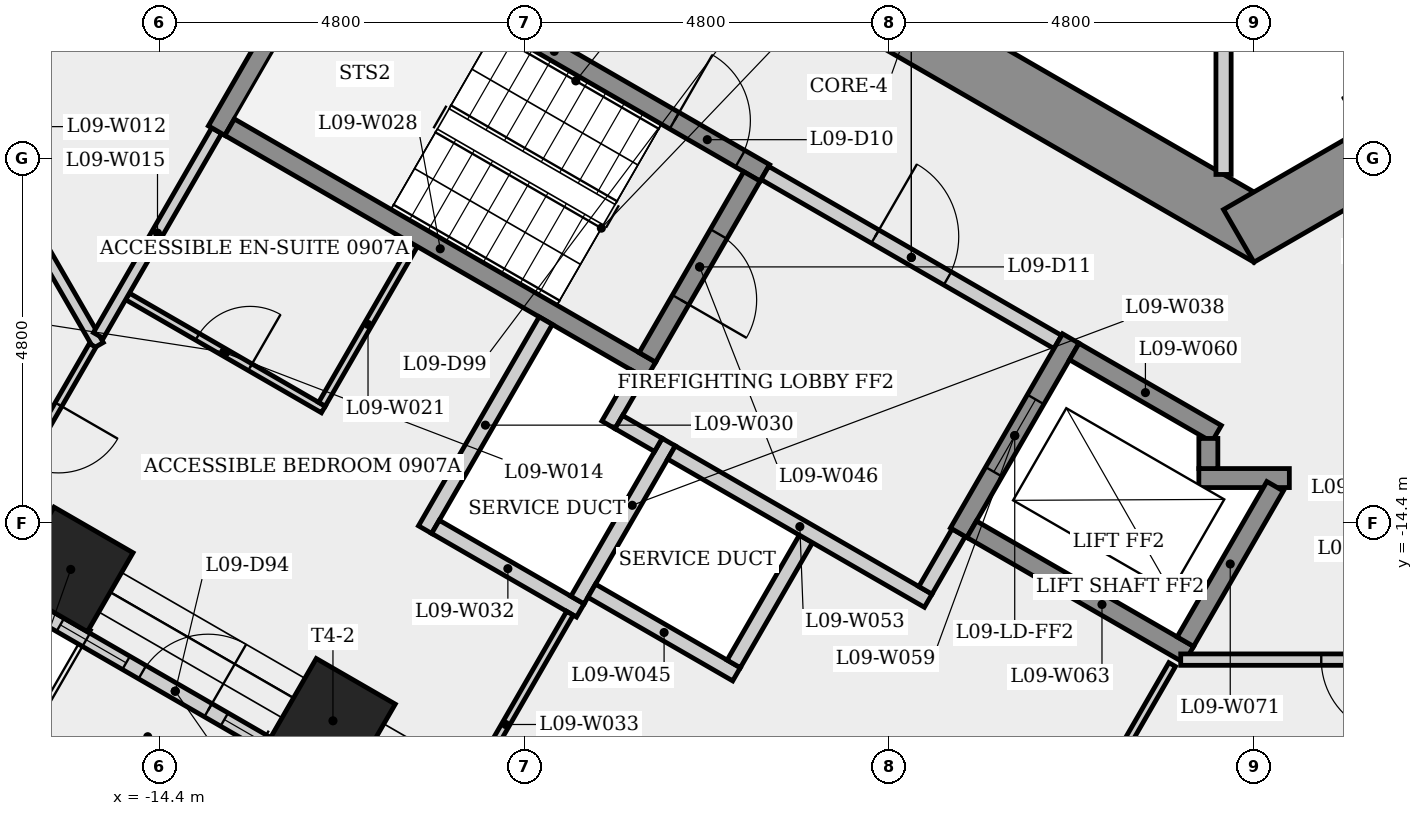
"""IFC4 building model, lengths in metres.
Left out: names, types, materials, properties, quantities, classifications, styles, units other than length and angle.
Written with IfcOpenShell. Run it as: python <this file> out.ifc"""

import sys

from ifc_helpers import new_model, si_unit, direction, frame, frame_2d, origin, origin_2d, place, context, subcontext, project, spatial, rectangle, extrude, element, fill, save


model = new_model("IFC4")
c1 = context("Model", 3, precision=1e-05, world=origin(), true_north=direction((0.0, 1.0)))
c2 = subcontext(c1, "Body", "Model", "MODEL_VIEW")
j1 = project(units=[si_unit("LENGTHUNIT", "METRE"), si_unit("PLANEANGLEUNIT", "RADIAN")], contexts=[c1])
p1 = place(None, origin())
s1 = spatial("IfcSite", under=j1, at=p1, CompositionType="ELEMENT")
p2 = place(p1, origin())
s2 = spatial("IfcBuilding", under=s1, at=p2, CompositionType="ELEMENT")
p3 = place(p2, frame((0.0, 0.0, 39.1)))
s3 = spatial("IfcBuildingStorey", under=s2, at=p3, CompositionType="ELEMENT", Elevation=39.1)
p4 = place(p3, frame((-9.3, -5.138, 0.0), z_axis=(0.0, 0.0, 1.0), x_axis=(0.866023993627, -0.500002442456, 0.0)))
e1 = element("IfcWall", 1, at=p4, inside=s3, PredefinedType="SHEAR", context=c2, shape_type="SweptSolid", body=[
    extrude(rectangle(XDim=10.97, YDim=0.8, at=frame_2d((5.485, 0.0))), origin(), (0.0, 0.0, 1.0), 3.4),
])
p5 = place(p4, frame((3.192, 0.0, 0.0)))
e2 = element("IfcOpeningElement", 2, at=p5, cuts=e1, PredefinedType="OPENING", context=c2, shape_type="SweptSolid", body=[
    extrude(rectangle(XDim=0.9, YDim=2.1, at=frame_2d((0.45, 1.05))), frame((0.0, 0.41, 0.0), z_axis=(0.0, -1.0, 0.0), x_axis=(1.0, 0.0, 0.0)), (0.0, 0.0, 1.0), 0.82),
])
p6 = place(p3, frame((-0.2, -10.623, 0.0), z_axis=(0.0, 0.0, 1.0), x_axis=(0.866023993627, 0.500002442456, 0.0)))
e3 = element("IfcWall", 3, at=p6, inside=s3, PredefinedType="SHEAR", context=c2, shape_type="SweptSolid", body=[
    extrude(rectangle(XDim=10.97, YDim=0.8, at=frame_2d((5.485, 0.0))), origin(), (0.0, 0.0, 1.0), 3.4),
])
p7 = place(p6, frame((2.091, 0.0, 0.0)))
e4 = element("IfcOpeningElement", 4, at=p7, cuts=e3, PredefinedType="OPENING", context=c2, shape_type="SweptSolid", body=[
    extrude(rectangle(XDim=0.9, YDim=2.1, at=frame_2d((0.45, 1.05))), frame((0.0, 0.41, 0.0), z_axis=(0.0, -1.0, 0.0), x_axis=(1.0, 0.0, 0.0)), (0.0, 0.0, 1.0), 0.82),
])
p8 = place(p6, frame((9.325, 0.0, 0.0)))
e5 = element("IfcOpeningElement", 5, at=p8, cuts=e3, PredefinedType="OPENING", context=c2, shape_type="SweptSolid", body=[
    extrude(rectangle(XDim=0.9, YDim=2.1, at=frame_2d((0.45, 1.05))), frame((0.0, 0.41, 0.0), z_axis=(0.0, -1.0, 0.0), x_axis=(1.0, 0.0, 0.0)), (0.0, 0.0, 1.0), 0.82),
])
for number, where, z_axis, x_axis in (
    (6, (-15.567, -15.012, 0.0), (0.0, 0.0, 1.0), (-0.5, -0.866, 0.0)),
    (7, (-12.117, -17.004, 0.0), (0.0, 0.0, 1.0), (-0.5, -0.866, 0.0)),
):
    element("IfcColumn", number, at=place(p3, frame(where, z_axis=z_axis, x_axis=x_axis)), inside=s3, PredefinedType="COLUMN", context=c2, shape_type="SweptSolid", body=[
        extrude(rectangle(XDim=1.2, YDim=1.2, at=origin_2d()), origin(), (0.0, 0.0, 1.0), 3.4),
    ])
p9 = place(p3, frame((-15.918, -15.618, 0.0), z_axis=(0.0, 0.0, 1.0), x_axis=(0.86602842894, -0.499994760241, 0.0)))
e8 = element("IfcWall", 8, at=p9, inside=s3, PredefinedType="SOLIDWALL", context=c2, shape_type="SweptSolid", body=[
    extrude(rectangle(XDim=3.984, YDim=0.2, at=frame_2d((1.992, 0.0))), origin(), (0.0, 0.0, 1.0), 3.4),
])
p10 = place(p9, frame((1.492, 0.0, 0.0)))
e9 = element("IfcOpeningElement", 9, at=p10, cuts=e8, PredefinedType="OPENING", context=c2, shape_type="SweptSolid", body=[
    extrude(rectangle(XDim=1.0, YDim=2.4, at=frame_2d((0.5, 1.2))), frame((0.0, 0.11, 0.0), z_axis=(0.0, -1.0, 0.0), x_axis=(1.0, 0.0, 0.0)), (0.0, 0.0, 1.0), 0.22),
])
p11 = place(p9, frame((0.246, 0.0, 0.9)))
e10 = element("IfcOpeningElement", 10, at=p11, cuts=e8, PredefinedType="OPENING", context=c2, shape_type="SweptSolid", body=[
    extrude(rectangle(XDim=1.0, YDim=1.5, at=frame_2d((0.5, 0.75))), frame((0.0, 0.11, 0.0), z_axis=(0.0, -1.0, 0.0), x_axis=(1.0, 0.0, 0.0)), (0.0, 0.0, 1.0), 0.22),
])
p12 = place(p9, frame((2.738, 0.0, 0.9)))
e11 = element("IfcOpeningElement", 11, at=p12, cuts=e8, PredefinedType="OPENING", context=c2, shape_type="SweptSolid", body=[
    extrude(rectangle(XDim=1.0, YDim=1.5, at=frame_2d((0.5, 0.75))), frame((0.0, 0.11, 0.0), z_axis=(0.0, -1.0, 0.0), x_axis=(1.0, 0.0, 0.0)), (0.0, 0.0, 1.0), 0.22),
])
p13 = place(p3, frame((-15.204, -12.064, 0.0), z_axis=(0.0, 0.0, 1.0), x_axis=(-0.500026652407, 0.866010015463, 0.0)))
e12 = element("IfcWall", 12, at=p13, inside=s3, PredefinedType="PARTITIONING", context=c2, shape_type="SweptSolid", body=[
    extrude(rectangle(XDim=6.646, YDim=0.15, at=frame_2d((3.323, 0.0))), origin(), (0.0, 0.0, 1.0), 3.05),
])
p14 = place(p13, frame((2.878, 0.0, 0.0)))
e13 = element("IfcOpeningElement", 13, at=p14, cuts=e12, PredefinedType="OPENING", context=c2, shape_type="SweptSolid", body=[
    extrude(rectangle(XDim=1.0, YDim=2.1, at=frame_2d((0.5, 1.05))), frame((0.0, 0.085, 0.0), z_axis=(0.0, -1.0, 0.0), x_axis=(1.0, 0.0, 0.0)), (0.0, 0.0, 1.0), 0.17),
])
p15 = place(p3, frame((-15.279, -12.064, 0.0), z_axis=(0.0, 0.0, 1.0), x_axis=(-0.500013311227, -0.866017718408, 0.0)))
e14 = element("IfcWall", 14, at=p15, inside=s3, PredefinedType="PARTITIONING", context=c2, shape_type="SweptSolid", body=[
    extrude(rectangle(XDim=3.294, YDim=0.1, at=frame_2d((1.647, 0.0))), origin(), (0.0, 0.0, 1.0), 3.05),
])
p16 = place(p15, frame((0.899, 0.0, 0.0)))
e15 = element("IfcOpeningElement", 15, at=p16, cuts=e14, PredefinedType="OPENING", context=c2, shape_type="SweptSolid", body=[
    extrude(rectangle(XDim=0.9, YDim=2.1, at=frame_2d((0.45, 1.05))), frame((0.0, 0.06, 0.0), z_axis=(0.0, -1.0, 0.0), x_axis=(1.0, 0.0, 0.0)), (0.0, 0.0, 1.0), 0.12),
])
p17 = place(p3, frame((-14.82, -11.42, 0.0), z_axis=(0.0, 0.0, 1.0), x_axis=(0.866017493347, -0.500013701029, 0.0)))
e16 = element("IfcWall", 16, at=p17, inside=s3, PredefinedType="PARTITIONING", context=c2, shape_type="SweptSolid", body=[
    extrude(rectangle(XDim=2.975, YDim=0.1, at=frame_2d((1.488, 0.0))), origin(), (0.0, 0.0, 1.0), 3.05),
])
p18 = place(p17, frame((1.062, 0.0, 0.0)))
e17 = element("IfcOpeningElement", 17, at=p18, cuts=e16, PredefinedType="OPENING", context=c2, shape_type="SweptSolid", body=[
    extrude(rectangle(XDim=0.8, YDim=2.1, at=frame_2d((0.4, 1.05))), frame((0.0, 0.06, 0.0), z_axis=(0.0, -1.0, 0.0), x_axis=(1.0, 0.0, 0.0)), (0.0, 0.0, 1.0), 0.12),
])
p19 = place(p3, frame((-15.204, -11.934, 0.0), z_axis=(0.0, 0.0, 1.0), x_axis=(0.500037089193, 0.86600398927, 0.0)))
e18 = element("IfcWall", 18, at=p19, inside=s3, PredefinedType="PARTITIONING", context=c2, shape_type="SweptSolid", body=[
    extrude(rectangle(XDim=3.112, YDim=0.15, at=frame_2d((1.556, 0.0))), origin(), (0.0, 0.0, 1.0), 3.05),
])
p20 = place(p3, frame((-13.648, -9.239, 0.0), z_axis=(0.0, 0.0, 1.0), x_axis=(0.500017246033, 0.866015446554, 0.0)))
e19 = element("IfcWall", 19, at=p20, inside=s3, PredefinedType="SHEAR", context=c2, shape_type="SweptSolid", body=[
    extrude(rectangle(XDim=3.25, YDim=0.25, at=frame_2d((1.625, 0.0))), origin(), (0.0, 0.0, 1.0), 3.05),
])
p21 = place(p3, frame((-12.262, -12.839, 0.0), z_axis=(0.0, 0.0, 1.0), x_axis=(0.499972286653, 0.866041403502, 0.0)))
e20 = element("IfcWall", 20, at=p21, inside=s3, PredefinedType="PARTITIONING", context=c2, shape_type="SweptSolid", body=[
    extrude(rectangle(XDim=2.425, YDim=0.1, at=frame_2d((1.212, 0.0))), origin(), (0.0, 0.0, 1.0), 3.05),
])
p22 = place(p3, frame((-11.977, -6.595, 0.0), z_axis=(0.0, 0.0, 1.0), x_axis=(0.866025499775, -0.499999833739, 0.0)))
e21 = element("IfcWall", 21, at=p22, inside=s3, PredefinedType="SHEAR", context=c2, shape_type="SweptSolid", body=[
    extrude(rectangle(XDim=6.4, YDim=0.25, at=frame_2d((3.2, 0.0))), origin(), (0.0, 0.0, 1.0), 3.05),
])
p23 = place(p22, frame((5.025, 0.0, 0.0)))
e22 = element("IfcOpeningElement", 22, at=p23, cuts=e21, PredefinedType="OPENING", context=c2, shape_type="SweptSolid", body=[
    extrude(rectangle(XDim=1.0, YDim=2.1, at=frame_2d((0.5, 1.05))), frame((0.0, 0.135, 0.0), z_axis=(0.0, -1.0, 0.0), x_axis=(1.0, 0.0, 0.0)), (0.0, 0.0, 1.0), 0.27),
])
p24 = place(p3, frame((-13.477, -9.193, 0.0), z_axis=(0.0, 0.0, 1.0), x_axis=(0.866025499775, -0.499999833739, 0.0)))
e23 = element("IfcWall", 23, at=p24, inside=s3, PredefinedType="SHEAR", context=c2, shape_type="SweptSolid", body=[
    extrude(rectangle(XDim=6.4, YDim=0.25, at=frame_2d((3.2, 0.0))), origin(), (0.0, 0.0, 1.0), 3.05),
])
p25 = place(p3, frame((-10.905, -14.489, 0.0), z_axis=(0.0, 0.0, 1.0), x_axis=(0.499959856469, 0.866048579423, 0.0)))
e24 = element("IfcWall", 24, at=p25, inside=s3, PredefinedType="PLUMBINGWALL", context=c2, shape_type="SweptSolid", body=[
    extrude(rectangle(XDim=3.175, YDim=0.2, at=frame_2d((1.587, 0.0))), origin(), (0.0, 0.0, 1.0), 3.05),
])
p26 = place(p3, frame((-8.863, -15.552, 0.0), z_axis=(0.0, 0.0, 1.0), x_axis=(-0.866035918664, 0.499981787252, 0.0)))
e25 = element("IfcWall", 25, at=p26, inside=s3, PredefinedType="PLUMBINGWALL", context=c2, shape_type="SweptSolid", body=[
    extrude(rectangle(XDim=2.2, YDim=0.2, at=frame_2d((1.1, 0.0))), origin(), (0.0, 0.0, 1.0), 3.05),
])
p27 = place(p3, frame((-9.0, -15.588, 0.0), z_axis=(0.0, 0.0, 1.0), x_axis=(-0.499968344795, -0.866043679154, 0.0)))
e26 = element("IfcWall", 26, at=p27, inside=s3, PredefinedType="PARTITIONING", context=c2, shape_type="SweptSolid", body=[
    extrude(rectangle(XDim=3.381, YDim=0.1, at=frame_2d((1.69, 0.0))), origin(), (0.0, 0.0, 1.0), 3.05),
])
p28 = place(p3, frame((-8.493, -13.11, 0.0), z_axis=(0.0, 0.0, 1.0), x_axis=(0.500067724834, 0.865986299303, 0.0)))
e27 = element("IfcWall", 27, at=p28, inside=s3, PredefinedType="PLUMBINGWALL", context=c2, shape_type="SweptSolid", body=[
    extrude(rectangle(XDim=0.775, YDim=0.2, at=frame_2d((0.388, 0.0))), origin(), (0.0, 0.0, 1.0), 3.05),
])
p29 = place(p3, frame((-7.7, -13.337, 0.0), z_axis=(0.0, 0.0, 1.0), x_axis=(-0.500001309137, -0.866024647952, 0.0)))
e28 = element("IfcWall", 28, at=p29, inside=s3, PredefinedType="PLUMBINGWALL", context=c2, shape_type="SweptSolid", body=[
    extrude(rectangle(XDim=2.4, YDim=0.2, at=frame_2d((1.2, 0.0))), origin(), (0.0, 0.0, 1.0), 3.05),
])
p30 = place(p3, frame((-7.836, -13.373, 0.0), z_axis=(0.0, 0.0, 1.0), x_axis=(-0.866232998003, 0.499640263761, 0.0)))
e29 = element("IfcWall", 29, at=p30, inside=s3, PredefinedType="PLUMBINGWALL", context=c2, shape_type="SweptSolid", body=[
    extrude(rectangle(XDim=0.6, YDim=0.2, at=frame_2d((0.3, 0.0))), origin(), (0.0, 0.0, 1.0), 3.05),
])
p31 = place(p3, frame((-6.808, -16.392, 0.0), z_axis=(0.0, 0.0, 1.0), x_axis=(-0.866008176907, 0.50002983664, 0.0)))
e30 = element("IfcWall", 30, at=p31, inside=s3, PredefinedType="PLUMBINGWALL", context=c2, shape_type="SweptSolid", body=[
    extrude(rectangle(XDim=2.2, YDim=0.2, at=frame_2d((1.1, 0.0))), origin(), (0.0, 0.0, 1.0), 3.05),
])
p32 = place(p3, frame((-6.605, -9.841, 0.0), z_axis=(0.0, 0.0, 1.0), x_axis=(-0.499996545922, -0.866027397988, 0.0)))
e31 = element("IfcWall", 31, at=p32, inside=s3, PredefinedType="SHEAR", context=c2, shape_type="SweptSolid", body=[
    extrude(rectangle(XDim=2.75, YDim=0.25, at=frame_2d((1.375, 0.0))), origin(), (0.0, 0.0, 1.0), 3.05),
])
p33 = place(p32, frame((0.875, 0.0, 0.0)))
e32 = element("IfcOpeningElement", 32, at=p33, cuts=e31, PredefinedType="OPENING", context=c2, shape_type="SweptSolid", body=[
    extrude(rectangle(XDim=1.0, YDim=2.1, at=frame_2d((0.5, 1.05))), frame((0.0, 0.135, 0.0), z_axis=(0.0, -1.0, 0.0), x_axis=(1.0, 0.0, 0.0)), (0.0, 0.0, 1.0), 0.27),
])
p34 = place(p3, frame((-6.435, -9.795, 0.0), z_axis=(0.0, 0.0, 1.0), x_axis=(0.866012907634, -0.500021643343, 0.0)))
e33 = element("IfcWall", 33, at=p34, inside=s3, PredefinedType="PARTITIONING", context=c2, shape_type="SweptSolid", body=[
    extrude(rectangle(XDim=4.45, YDim=0.2, at=frame_2d((2.225, 0.0))), origin(), (0.0, 0.0, 1.0), 3.05),
])
p35 = place(p34, frame((1.675, 0.0, 0.0)))
e34 = element("IfcOpeningElement", 34, at=p35, cuts=e33, PredefinedType="OPENING", context=c2, shape_type="SweptSolid", body=[
    extrude(rectangle(XDim=1.1, YDim=2.1, at=frame_2d((0.55, 1.05))), frame((0.0, 0.11, 0.0), z_axis=(0.0, -1.0, 0.0), x_axis=(1.0, 0.0, 0.0)), (0.0, 0.0, 1.0), 0.22),
])
p36 = place(p3, frame((-5.895, -14.61, 0.0), z_axis=(0.0, 0.0, 1.0), x_axis=(-0.500022797313, -0.86601224135, 0.0)))
e35 = element("IfcWall", 35, at=p36, inside=s3, PredefinedType="PLUMBINGWALL", context=c2, shape_type="SweptSolid", body=[
    extrude(rectangle(XDim=1.9, YDim=0.2, at=frame_2d((0.95, 0.0))), origin(), (0.0, 0.0, 1.0), 3.05),
])
p37 = place(p3, frame((-4.286, -15.423, 0.0), z_axis=(0.0, 0.0, 1.0), x_axis=(-0.866042777325, 0.499969906938, 0.0)))
e36 = element("IfcWall", 36, at=p37, inside=s3, PredefinedType="PARTITIONING", context=c2, shape_type="SweptSolid", body=[
    extrude(rectangle(XDim=3.9, YDim=0.2, at=frame_2d((1.95, 0.0))), origin(), (0.0, 0.0, 1.0), 3.05),
])
p38 = place(p3, frame((-4.455, -22.116, 0.0), z_axis=(0.0, 0.0, 1.0), x_axis=(0.499982026803, 0.866035780366, 0.0)))
e37 = element("IfcWall", 37, at=p38, inside=s3, PredefinedType="PARTITIONING", context=c2, shape_type="SweptSolid", body=[
    extrude(rectangle(XDim=6.758, YDim=0.1, at=frame_2d((3.379, 0.0))), origin(), (0.0, 0.0, 1.0), 3.05),
])
p39 = place(p38, frame((3.227, 0.0, 0.0)))
e38 = element("IfcOpeningElement", 38, at=p39, cuts=e37, PredefinedType="OPENING", context=c2, shape_type="SweptSolid", body=[
    extrude(rectangle(XDim=0.9, YDim=2.1, at=frame_2d((0.45, 1.05))), frame((0.0, 0.06, 0.0), z_axis=(0.0, -1.0, 0.0), x_axis=(1.0, 0.0, 0.0)), (0.0, 0.0, 1.0), 0.12),
])
p40 = place(p3, frame((-3.885, -14.529, 0.0), z_axis=(0.0, 0.0, 1.0), x_axis=(-0.499859285417, -0.866106630146, 0.0)))
e39 = element("IfcWall", 39, at=p40, inside=s3, PredefinedType="PARTITIONING", context=c2, shape_type="SweptSolid", body=[
    extrude(rectangle(XDim=0.875, YDim=0.2, at=frame_2d((0.438, 0.0))), origin(), (0.0, 0.0, 1.0), 3.05),
])
p41 = place(p3, frame((-2.41, -11.974, 0.0), z_axis=(0.0, 0.0, 1.0), x_axis=(-0.500001826776, -0.866024349092, 0.0)))
e40 = element("IfcWall", 40, at=p41, inside=s3, PredefinedType="SHEAR", context=c2, shape_type="SweptSolid", body=[
    extrude(rectangle(XDim=2.95, YDim=0.25, at=frame_2d((1.475, 0.0))), origin(), (0.0, 0.0, 1.0), 3.05),
])
p42 = place(p41, frame((0.925, 0.0, 0.0)))
e41 = element("IfcOpeningElement", 41, at=p42, cuts=e40, PredefinedType="OPENING", context=c2, shape_type="SweptSolid", body=[
    extrude(rectangle(XDim=1.1, YDim=2.1, at=frame_2d((0.55, 1.05))), frame((0.0, 0.135, 0.0), z_axis=(0.0, -1.0, 0.0), x_axis=(1.0, 0.0, 0.0)), (0.0, 0.0, 1.0), 0.27),
])
p43 = place(p3, frame((-2.364, -12.145, 0.0), z_axis=(0.0, 0.0, 1.0), x_axis=(0.86603892542, -0.499976579108, 0.0)))
e42 = element("IfcWall", 42, at=p43, inside=s3, PredefinedType="SHEAR", context=c2, shape_type="SweptSolid", body=[
    extrude(rectangle(XDim=2.162, YDim=0.25, at=frame_2d((1.081, 0.0))), origin(), (0.0, 0.0, 1.0), 3.05),
])
p44 = place(p3, frame((-0.856, -16.133, 0.0), z_axis=(0.0, 0.0, 1.0), x_axis=(-0.866021716278, 0.500006386895, 0.0)))
e43 = element("IfcWall", 43, at=p44, inside=s3, PredefinedType="SHEAR", context=c2, shape_type="SweptSolid", body=[
    extrude(rectangle(XDim=3.3, YDim=0.25, at=frame_2d((1.65, 0.0))), origin(), (0.0, 0.0, 1.0), 3.05),
])
p45 = place(p3, frame((-0.725, -13.81, 0.0), z_axis=(0.0, 0.0, 1.0), x_axis=(1.0, 0.0, 0.0)))
e44 = element("IfcWall", 44, at=p45, inside=s3, PredefinedType="SHEAR", context=c2, shape_type="SweptSolid", body=[
    extrude(rectangle(XDim=1.191, YDim=0.25, at=frame_2d((0.595, 0.0))), origin(), (0.0, 0.0, 1.0), 3.05),
])
p46 = place(p3, frame((-0.6, -13.289, 0.0), z_axis=(0.0, 0.0, 1.0), x_axis=(0.0, -1.0, 0.0)))
e45 = element("IfcWall", 45, at=p46, inside=s3, PredefinedType="SHEAR", context=c2, shape_type="SweptSolid", body=[
    extrude(rectangle(XDim=0.396, YDim=0.25, at=frame_2d((0.198, 0.0))), origin(), (0.0, 0.0, 1.0), 3.4),
])
p47 = place(p3, frame((-0.4, -5.275, 0.0), z_axis=(0.0, 0.0, 1.0), x_axis=(0.0, -1.0, 0.0)))
e46 = element("IfcWall", 46, at=p47, inside=s3, PredefinedType="PARTITIONING", context=c2, shape_type="SweptSolid", body=[
    extrude(rectangle(XDim=4.54, YDim=0.2, at=frame_2d((2.27, 0.0))), origin(), (0.0, 0.0, 1.0), 3.05),
])
p48 = place(p3, frame((0.278, -13.918, 0.0), z_axis=(0.0, 0.0, 1.0), x_axis=(-0.49998806882, -0.866032292145, 0.0)))
e47 = element("IfcWall", 47, at=p48, inside=s3, PredefinedType="SHEAR", context=c2, shape_type="SweptSolid", body=[
    extrude(rectangle(XDim=2.36, YDim=0.25, at=frame_2d((1.18, 0.0))), origin(), (0.0, 0.0, 1.0), 3.4),
])
p49 = place(p3, frame((3.735, -16.199, 0.0), z_axis=(0.0, 0.0, 1.0), x_axis=(-1.0, 0.0, 0.0)))
e48 = element("IfcWall", 48, at=p49, inside=s3, PredefinedType="PARTITIONING", context=c2, shape_type="SweptSolid", body=[
    extrude(rectangle(XDim=4.698, YDim=0.15, at=frame_2d((2.349, 0.0))), origin(), (0.0, 0.0, 1.0), 3.05),
])
p50 = place(p49, frame((1.849, 0.0, 0.0)))
e49 = element("IfcOpeningElement", 49, at=p50, cuts=e48, PredefinedType="OPENING", context=c2, shape_type="SweptSolid", body=[
    extrude(rectangle(XDim=1.0, YDim=2.1, at=frame_2d((0.5, 1.05))), frame((0.0, 0.085, 0.0), z_axis=(0.0, -1.0, 0.0), x_axis=(1.0, 0.0, 0.0)), (0.0, 0.0, 1.0), 0.17),
])
p51 = place(p10, origin())
e50 = element("IfcDoor", 50, at=p51, inside=s3, OperationType="SINGLE_SWING_RIGHT", PredefinedType="DOOR", context=c2, shape_type="SweptSolid", body=[
    extrude(rectangle(XDim=1.0, YDim=2.4, at=frame_2d((0.5, 1.2))), frame((0.0, 0.025, 0.0), z_axis=(0.0, -1.0, 0.0), x_axis=(1.0, 0.0, 0.0)), (0.0, 0.0, 1.0), 0.05),
])
fill(e9, e50)
p52 = place(p11, origin())
e51 = element("IfcWindow", 51, at=p52, inside=s3, PartitioningType="SINGLE_PANEL", PredefinedType="WINDOW", context=c2, shape_type="SweptSolid", body=[
    extrude(rectangle(XDim=1.0, YDim=1.5, at=frame_2d((0.5, 0.75))), frame((0.0, 0.03, 0.0), z_axis=(0.0, -1.0, 0.0), x_axis=(1.0, 0.0, 0.0)), (0.0, 0.0, 1.0), 0.06),
])
fill(e10, e51)
p53 = place(p12, origin())
e52 = element("IfcWindow", 52, at=p53, inside=s3, PartitioningType="SINGLE_PANEL", PredefinedType="WINDOW", context=c2, shape_type="SweptSolid", body=[
    extrude(rectangle(XDim=1.0, YDim=1.5, at=frame_2d((0.5, 0.75))), frame((0.0, 0.03, 0.0), z_axis=(0.0, -1.0, 0.0), x_axis=(1.0, 0.0, 0.0)), (0.0, 0.0, 1.0), 0.06),
])
fill(e11, e52)
p54 = place(p23, origin())
e53 = element("IfcDoor", 53, at=p54, inside=s3, OperationType="SINGLE_SWING_LEFT", PredefinedType="DOOR", context=c2, shape_type="SweptSolid", body=[
    extrude(rectangle(XDim=1.0, YDim=2.1, at=frame_2d((0.5, 1.05))), frame((0.0, 0.025, 0.0), z_axis=(0.0, -1.0, 0.0), x_axis=(1.0, 0.0, 0.0)), (0.0, 0.0, 1.0), 0.05),
])
fill(e22, e53)
p55 = place(p33, origin())
e54 = element("IfcDoor", 54, at=p55, inside=s3, OperationType="SINGLE_SWING_RIGHT", PredefinedType="DOOR", context=c2, shape_type="SweptSolid", body=[
    extrude(rectangle(XDim=1.0, YDim=2.1, at=frame_2d((0.5, 1.05))), frame((0.0, 0.025, 0.0), z_axis=(0.0, -1.0, 0.0), x_axis=(1.0, 0.0, 0.0)), (0.0, 0.0, 1.0), 0.05),
])
fill(e32, e54)
p56 = place(p35, origin())
e55 = element("IfcDoor", 55, at=p56, inside=s3, OperationType="SINGLE_SWING_LEFT", PredefinedType="DOOR", context=c2, shape_type="SweptSolid", body=[
    extrude(rectangle(XDim=1.1, YDim=2.1, at=frame_2d((0.55, 1.05))), frame((0.0, 0.025, 0.0), z_axis=(0.0, -1.0, 0.0), x_axis=(1.0, 0.0, 0.0)), (0.0, 0.0, 1.0), 0.05),
])
fill(e34, e55)
p57 = place(p42, origin())
e56 = element("IfcDoor", 56, at=p57, inside=s3, OperationType="SLIDING_TO_LEFT", PredefinedType="DOOR", context=c2, shape_type="SweptSolid", body=[
    extrude(rectangle(XDim=1.1, YDim=2.1, at=frame_2d((0.55, 1.05))), frame((0.0, 0.025, 0.0), z_axis=(0.0, -1.0, 0.0), x_axis=(1.0, 0.0, 0.0)), (0.0, 0.0, 1.0), 0.05),
])
fill(e41, e56)
p58 = place(p16, origin())
e57 = element("IfcDoor", 57, at=p58, inside=s3, OperationType="SINGLE_SWING_LEFT", PredefinedType="DOOR", context=c2, shape_type="SweptSolid", body=[
    extrude(rectangle(XDim=0.9, YDim=2.1, at=frame_2d((0.45, 1.05))), frame((0.0, 0.025, 0.0), z_axis=(0.0, -1.0, 0.0), x_axis=(1.0, 0.0, 0.0)), (0.0, 0.0, 1.0), 0.05),
])
fill(e15, e57)
p59 = place(p18, origin())
e58 = element("IfcDoor", 58, at=p59, inside=s3, OperationType="SINGLE_SWING_RIGHT", PredefinedType="DOOR", context=c2, shape_type="SweptSolid", body=[
    extrude(rectangle(XDim=0.8, YDim=2.1, at=frame_2d((0.4, 1.05))), frame((0.0, 0.025, 0.0), z_axis=(0.0, -1.0, 0.0), x_axis=(1.0, 0.0, 0.0)), (0.0, 0.0, 1.0), 0.05),
])
fill(e17, e58)
p60 = place(p50, origin())
e59 = element("IfcDoor", 59, at=p60, inside=s3, OperationType="SINGLE_SWING_LEFT", PredefinedType="DOOR", context=c2, shape_type="SweptSolid", body=[
    extrude(rectangle(XDim=1.0, YDim=2.1, at=frame_2d((0.5, 1.05))), frame((0.0, 0.025, 0.0), z_axis=(0.0, -1.0, 0.0), x_axis=(1.0, 0.0, 0.0)), (0.0, 0.0, 1.0), 0.05),
])
fill(e49, e59)
save(model, sys.argv[1])
